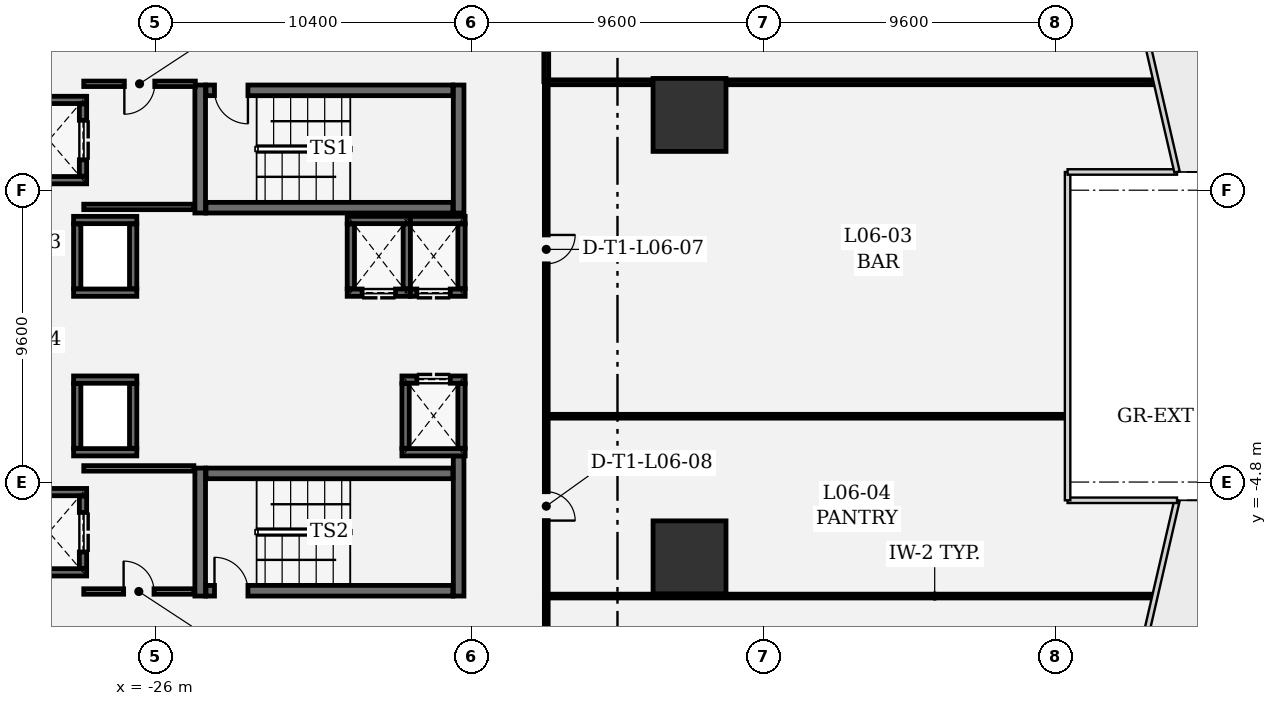
"""IFC4 building model, lengths in metres.
Left out: names, types, materials, properties, quantities, classifications, styles, units other than length and angle.
Written with IfcOpenShell. Run it as: python <this file> out.ifc"""

import sys

from ifc_helpers import new_model, si_unit, direction, frame, frame_2d, origin, origin_2d, place, context, subcontext, project, spatial, rectangle, extrude, element, fill, save


model = new_model("IFC4")
c1 = context("Model", 3, precision=1e-05, world=origin(), true_north=direction((0.0, 1.0)))
c2 = subcontext(c1, "Body", "Model", "MODEL_VIEW")
j1 = project(units=[si_unit("LENGTHUNIT", "METRE"), si_unit("PLANEANGLEUNIT", "RADIAN")], contexts=[c1])
p1 = place(None, origin())
s1 = spatial("IfcSite", under=j1, at=p1, CompositionType="ELEMENT")
p2 = place(p1, origin())
s2 = spatial("IfcBuilding", under=s1, at=p2, CompositionType="ELEMENT")
p3 = place(p2, frame((0.0, 0.0, 32.4)))
s3 = spatial("IfcBuildingStorey", under=s2, at=p3, CompositionType="ELEMENT", Elevation=32.4)
for number, where, z_axis, x_axis in (
    (1, (-8.43, -7.276, 0.0), (0.0, 0.0, 1.0), (1.0, 0.0, 0.0)),
    (2, (-8.43, 7.276, 0.0), (0.0, 0.0, 1.0), (1.0, 0.0, 0.0)),
):
    element("IfcColumn", number, at=place(p3, frame(where, z_axis=z_axis, x_axis=x_axis)), inside=s3, PredefinedType="COLUMN", context=c2, shape_type="SweptSolid", body=[
        extrude(rectangle(XDim=2.4, YDim=2.4, at=origin_2d()), origin(), (0.0, 0.0, 1.0), 4.2),
    ])
for number, where, z_axis, x_axis in (
    (3, (-24.525, 8.26, 0.0), (0.0, 0.0, 1.0), (0.0, -1.0, 0.0)),
    (4, (-16.025, 4.05, 0.0), (0.0, 0.0, 1.0), (0.0, 1.0, 0.0)),
):
    element("IfcWall", number, at=place(p3, frame(where, z_axis=z_axis, x_axis=x_axis)), inside=s3, PredefinedType="SHEAR", context=c2, shape_type="SweptSolid", body=[
        extrude(rectangle(XDim=4.21, YDim=0.35, at=frame_2d((2.105, 0.0))), origin(), (0.0, 0.0, 1.0), 3.92),
    ])
p4 = place(p3, frame((-24.335, 4.225, 0.0), z_axis=(0.0, 0.0, 1.0), x_axis=(1.0, 0.0, 0.0)))
e5 = element("IfcWall", 5, at=p4, inside=s3, PredefinedType="SHEAR", context=c2, shape_type="SweptSolid", body=[
    extrude(rectangle(XDim=8.12, YDim=0.35, at=frame_2d((4.06, 0.0))), origin(), (0.0, 0.0, 1.0), 3.92),
])
p5 = place(p3, frame((-16.215, 8.085, 0.0), z_axis=(0.0, 0.0, 1.0), x_axis=(-1.0, 0.0, 0.0)))
e6 = element("IfcWall", 6, at=p5, inside=s3, PredefinedType="SHEAR", context=c2, shape_type="SweptSolid", body=[
    extrude(rectangle(XDim=8.12, YDim=0.35, at=frame_2d((4.06, 0.0))), origin(), (0.0, 0.0, 1.0), 3.92),
])
p6 = place(p5, frame((6.74, 0.0, 0.0)))
e7 = element("IfcOpeningElement", 7, at=p6, cuts=e6, PredefinedType="OPENING", context=c2, shape_type="SweptSolid", body=[
    extrude(rectangle(XDim=1.1, YDim=2.2, at=frame_2d((0.55, 1.1))), frame((0.0, 0.185, 0.0), z_axis=(0.0, -1.0, 0.0), x_axis=(1.0, 0.0, 0.0)), (0.0, 0.0, 1.0), 0.37),
])
p7 = place(p3, frame((-24.525, -4.34, 0.0), z_axis=(0.0, 0.0, 1.0), x_axis=(0.0, -1.0, 0.0)))
e8 = element("IfcWall", 8, at=p7, inside=s3, PredefinedType="SHEAR", context=c2, shape_type="SweptSolid", body=[
    extrude(rectangle(XDim=4.21, YDim=0.35, at=frame_2d((2.105, 0.0))), origin(), (0.0, 0.0, 1.0), 3.92),
])
p8 = place(p3, frame((-16.025, -8.55, 0.0), z_axis=(0.0, 0.0, 1.0), x_axis=(0.0, 1.0, 0.0)))
e9 = element("IfcWall", 9, at=p8, inside=s3, PredefinedType="SHEAR", context=c2, shape_type="SweptSolid", body=[
    extrude(rectangle(XDim=4.61, YDim=0.35, at=frame_2d((2.305, 0.0))), origin(), (0.0, 0.0, 1.0), 3.92),
])
p9 = place(p3, frame((-24.335, -8.375, 0.0), z_axis=(0.0, 0.0, 1.0), x_axis=(1.0, 0.0, 0.0)))
e10 = element("IfcWall", 10, at=p9, inside=s3, PredefinedType="SHEAR", context=c2, shape_type="SweptSolid", body=[
    extrude(rectangle(XDim=8.12, YDim=0.35, at=frame_2d((4.06, 0.0))), origin(), (0.0, 0.0, 1.0), 3.92),
])
p10 = place(p9, frame((0.28, 0.0, 0.0)))
e11 = element("IfcOpeningElement", 11, at=p10, cuts=e10, PredefinedType="OPENING", context=c2, shape_type="SweptSolid", body=[
    extrude(rectangle(XDim=1.1, YDim=2.2, at=frame_2d((0.55, 1.1))), frame((0.0, 0.185, 0.0), z_axis=(0.0, -1.0, 0.0), x_axis=(1.0, 0.0, 0.0)), (0.0, 0.0, 1.0), 0.37),
])
p11 = place(p3, frame((-16.215, -4.515, 0.0), z_axis=(0.0, 0.0, 1.0), x_axis=(-1.0, 0.0, 0.0)))
e12 = element("IfcWall", 12, at=p11, inside=s3, PredefinedType="SHEAR", context=c2, shape_type="SweptSolid", body=[
    extrude(rectangle(XDim=8.12, YDim=0.35, at=frame_2d((4.06, 0.0))), origin(), (0.0, 0.0, 1.0), 3.92),
])
for number, where, z_axis, x_axis in (
    (13, (-28.26, 5.13, 0.0), (0.0, 0.0, 1.0), (-1.0, 0.0, 0.0)),
    (14, (-30.74, 7.77, 0.0), (0.0, 0.0, 1.0), (1.0, 0.0, 0.0)),
):
    element("IfcWall", number, at=place(p3, frame(where, z_axis=z_axis, x_axis=x_axis)), inside=s3, PredefinedType="SHEAR", context=c2, shape_type="SweptSolid", body=[
        extrude(rectangle(XDim=2.48, YDim=0.24, at=frame_2d((1.24, 0.0))), origin(), (0.0, 0.0, 1.0), 3.92),
    ])
p12 = place(p3, frame((-28.38, 7.638, 0.0), z_axis=(0.0, 0.0, 1.0), x_axis=(0.0, -1.0, 0.0)))
e15 = element("IfcWall", 15, at=p12, inside=s3, PredefinedType="SHEAR", context=c2, shape_type="SweptSolid", body=[
    extrude(rectangle(XDim=2.376, YDim=0.24, at=frame_2d((1.188, 0.0))), origin(), (0.0, 0.0, 1.0), 3.92),
])
p13 = place(p12, frame((0.538, 0.0, 0.0)))
e16 = element("IfcOpeningElement", 16, at=p13, cuts=e15, PredefinedType="OPENING", context=c2, shape_type="SweptSolid", body=[
    extrude(rectangle(XDim=1.3, YDim=2.3, at=frame_2d((0.65, 1.15))), frame((0.0, 0.13, 0.0), z_axis=(0.0, -1.0, 0.0), x_axis=(1.0, 0.0, 0.0)), (0.0, 0.0, 1.0), 0.26),
])
for number, where, z_axis, x_axis in (
    (17, (-28.26, -7.77, 0.0), (0.0, 0.0, 1.0), (-1.0, 0.0, 0.0)),
    (18, (-30.74, -5.13, 0.0), (0.0, 0.0, 1.0), (1.0, 0.0, 0.0)),
):
    element("IfcWall", number, at=place(p3, frame(where, z_axis=z_axis, x_axis=x_axis)), inside=s3, PredefinedType="SHEAR", context=c2, shape_type="SweptSolid", body=[
        extrude(rectangle(XDim=2.48, YDim=0.24, at=frame_2d((1.24, 0.0))), origin(), (0.0, 0.0, 1.0), 3.92),
    ])
p14 = place(p3, frame((-28.38, -5.262, 0.0), z_axis=(0.0, 0.0, 1.0), x_axis=(0.0, -1.0, 0.0)))
e19 = element("IfcWall", 19, at=p14, inside=s3, PredefinedType="SHEAR", context=c2, shape_type="SweptSolid", body=[
    extrude(rectangle(XDim=2.376, YDim=0.24, at=frame_2d((1.188, 0.0))), origin(), (0.0, 0.0, 1.0), 3.92),
])
p15 = place(p14, frame((0.538, 0.0, 0.0)))
e20 = element("IfcOpeningElement", 20, at=p15, cuts=e19, PredefinedType="OPENING", context=c2, shape_type="SweptSolid", body=[
    extrude(rectangle(XDim=1.3, YDim=2.3, at=frame_2d((0.65, 1.15))), frame((0.0, 0.13, 0.0), z_axis=(0.0, -1.0, 0.0), x_axis=(1.0, 0.0, 0.0)), (0.0, 0.0, 1.0), 0.26),
])
for number, where, z_axis, x_axis in (
    (21, (-26.61, 1.43, 0.0), (0.0, 0.0, 1.0), (-1.0, 0.0, 0.0)),
    (22, (-28.69, 3.82, 0.0), (0.0, 0.0, 1.0), (1.0, 0.0, 0.0)),
):
    element("IfcWall", number, at=place(p3, frame(where, z_axis=z_axis, x_axis=x_axis)), inside=s3, PredefinedType="SHEAR", context=c2, shape_type="SweptSolid", body=[
        extrude(rectangle(XDim=2.08, YDim=0.24, at=frame_2d((1.04, 0.0))), origin(), (0.0, 0.0, 1.0), 3.92),
    ])
for number, where, z_axis, x_axis in (
    (23, (-28.57, 1.562, 0.0), (0.0, 0.0, 1.0), (0.0, 1.0, 0.0)),
    (24, (-26.73, 3.688, 0.0), (0.0, 0.0, 1.0), (0.0, -1.0, 0.0)),
):
    element("IfcWall", number, at=place(p3, frame(where, z_axis=z_axis, x_axis=x_axis)), inside=s3, PredefinedType="SHEAR", context=c2, shape_type="SweptSolid", body=[
        extrude(rectangle(XDim=2.126, YDim=0.24, at=frame_2d((1.063, 0.0))), origin(), (0.0, 0.0, 1.0), 3.92),
    ])
p16 = place(p3, frame((-17.61, 1.43, 0.0), z_axis=(0.0, 0.0, 1.0), x_axis=(-1.0, 0.0, 0.0)))
e25 = element("IfcWall", 25, at=p16, inside=s3, PredefinedType="SHEAR", context=c2, shape_type="SweptSolid", body=[
    extrude(rectangle(XDim=2.08, YDim=0.24, at=frame_2d((1.04, 0.0))), origin(), (0.0, 0.0, 1.0), 3.92),
])
p17 = place(p16, frame((0.49, 0.0, 0.0)))
e26 = element("IfcOpeningElement", 26, at=p17, cuts=e25, PredefinedType="OPENING", context=c2, shape_type="SweptSolid", body=[
    extrude(rectangle(XDim=1.1, YDim=2.2, at=frame_2d((0.55, 1.1))), frame((0.0, 0.13, 0.0), z_axis=(0.0, -1.0, 0.0), x_axis=(1.0, 0.0, 0.0)), (0.0, 0.0, 1.0), 0.26),
])
p18 = place(p3, frame((-19.69, 3.82, 0.0), z_axis=(0.0, 0.0, 1.0), x_axis=(1.0, 0.0, 0.0)))
e27 = element("IfcWall", 27, at=p18, inside=s3, PredefinedType="SHEAR", context=c2, shape_type="SweptSolid", body=[
    extrude(rectangle(XDim=2.08, YDim=0.24, at=frame_2d((1.04, 0.0))), origin(), (0.0, 0.0, 1.0), 3.92),
])
for number, where, z_axis, x_axis in (
    (28, (-19.57, 1.562, 0.0), (0.0, 0.0, 1.0), (0.0, 1.0, 0.0)),
    (29, (-17.73, 3.688, 0.0), (0.0, 0.0, 1.0), (0.0, -1.0, 0.0)),
):
    element("IfcWall", number, at=place(p3, frame(where, z_axis=z_axis, x_axis=x_axis)), inside=s3, PredefinedType="SHEAR", context=c2, shape_type="SweptSolid", body=[
        extrude(rectangle(XDim=2.126, YDim=0.24, at=frame_2d((1.063, 0.0))), origin(), (0.0, 0.0, 1.0), 3.92),
    ])
p19 = place(p3, frame((-15.81, 1.43, 0.0), z_axis=(0.0, 0.0, 1.0), x_axis=(-1.0, 0.0, 0.0)))
e30 = element("IfcWall", 30, at=p19, inside=s3, PredefinedType="SHEAR", context=c2, shape_type="SweptSolid", body=[
    extrude(rectangle(XDim=1.8, YDim=0.24, at=frame_2d((0.9, 0.0))), origin(), (0.0, 0.0, 1.0), 3.92),
])
p20 = place(p19, frame((0.49, 0.0, 0.0)))
e31 = element("IfcOpeningElement", 31, at=p20, cuts=e30, PredefinedType="OPENING", context=c2, shape_type="SweptSolid", body=[
    extrude(rectangle(XDim=1.1, YDim=2.2, at=frame_2d((0.55, 1.1))), frame((0.0, 0.13, 0.0), z_axis=(0.0, -1.0, 0.0), x_axis=(1.0, 0.0, 0.0)), (0.0, 0.0, 1.0), 0.26),
])
p21 = place(p3, frame((-17.61, 3.82, 0.0), z_axis=(0.0, 0.0, 1.0), x_axis=(1.0, 0.0, 0.0)))
e32 = element("IfcWall", 32, at=p21, inside=s3, PredefinedType="SHEAR", context=c2, shape_type="SweptSolid", body=[
    extrude(rectangle(XDim=1.8, YDim=0.24, at=frame_2d((0.9, 0.0))), origin(), (0.0, 0.0, 1.0), 3.92),
])
p22 = place(p3, frame((-15.93, 3.688, 0.0), z_axis=(0.0, 0.0, 1.0), x_axis=(0.0, -1.0, 0.0)))
e33 = element("IfcWall", 33, at=p22, inside=s3, PredefinedType="SHEAR", context=c2, shape_type="SweptSolid", body=[
    extrude(rectangle(XDim=2.126, YDim=0.24, at=frame_2d((1.063, 0.0))), origin(), (0.0, 0.0, 1.0), 3.92),
])
for number, where, z_axis, x_axis in (
    (34, (-26.61, -3.82, 0.0), (0.0, 0.0, 1.0), (-1.0, 0.0, 0.0)),
    (35, (-28.69, -1.43, 0.0), (0.0, 0.0, 1.0), (1.0, 0.0, 0.0)),
):
    element("IfcWall", number, at=place(p3, frame(where, z_axis=z_axis, x_axis=x_axis)), inside=s3, PredefinedType="SHEAR", context=c2, shape_type="SweptSolid", body=[
        extrude(rectangle(XDim=2.08, YDim=0.24, at=frame_2d((1.04, 0.0))), origin(), (0.0, 0.0, 1.0), 3.92),
    ])
for number, where, z_axis, x_axis in (
    (36, (-28.57, -3.688, 0.0), (0.0, 0.0, 1.0), (0.0, 1.0, 0.0)),
    (37, (-26.73, -1.562, 0.0), (0.0, 0.0, 1.0), (0.0, -1.0, 0.0)),
):
    element("IfcWall", number, at=place(p3, frame(where, z_axis=z_axis, x_axis=x_axis)), inside=s3, PredefinedType="SHEAR", context=c2, shape_type="SweptSolid", body=[
        extrude(rectangle(XDim=2.126, YDim=0.24, at=frame_2d((1.063, 0.0))), origin(), (0.0, 0.0, 1.0), 3.92),
    ])
p23 = place(p3, frame((-15.81, -3.82, 0.0), z_axis=(0.0, 0.0, 1.0), x_axis=(-1.0, 0.0, 0.0)))
e38 = element("IfcWall", 38, at=p23, inside=s3, PredefinedType="SHEAR", context=c2, shape_type="SweptSolid", body=[
    extrude(rectangle(XDim=2.08, YDim=0.24, at=frame_2d((1.04, 0.0))), origin(), (0.0, 0.0, 1.0), 3.92),
])
p24 = place(p3, frame((-17.89, -1.43, 0.0), z_axis=(0.0, 0.0, 1.0), x_axis=(1.0, 0.0, 0.0)))
e39 = element("IfcWall", 39, at=p24, inside=s3, PredefinedType="SHEAR", context=c2, shape_type="SweptSolid", body=[
    extrude(rectangle(XDim=2.08, YDim=0.24, at=frame_2d((1.04, 0.0))), origin(), (0.0, 0.0, 1.0), 3.92),
])
p25 = place(p24, frame((0.49, 0.0, 0.0)))
e40 = element("IfcOpeningElement", 40, at=p25, cuts=e39, PredefinedType="OPENING", context=c2, shape_type="SweptSolid", body=[
    extrude(rectangle(XDim=1.1, YDim=2.2, at=frame_2d((0.55, 1.1))), frame((0.0, 0.13, 0.0), z_axis=(0.0, -1.0, 0.0), x_axis=(1.0, 0.0, 0.0)), (0.0, 0.0, 1.0), 0.26),
])
for number, where, z_axis, x_axis in (
    (41, (-17.77, -3.688, 0.0), (0.0, 0.0, 1.0), (0.0, 1.0, 0.0)),
    (42, (-15.93, -1.562, 0.0), (0.0, 0.0, 1.0), (0.0, -1.0, 0.0)),
):
    element("IfcWall", number, at=place(p3, frame(where, z_axis=z_axis, x_axis=x_axis)), inside=s3, PredefinedType="SHEAR", context=c2, shape_type="SweptSolid", body=[
        extrude(rectangle(XDim=2.126, YDim=0.24, at=frame_2d((1.063, 0.0))), origin(), (0.0, 0.0, 1.0), 3.92),
    ])
p26 = place(p3, frame((-28.355, 4.25, 0.0), z_axis=(0.0, 0.0, 1.0), x_axis=(1.0, 0.0, 0.0)))
e43 = element("IfcWall", 43, at=p26, inside=s3, PredefinedType="PARTITIONING", context=c2, shape_type="SweptSolid", body=[
    extrude(rectangle(XDim=3.622, YDim=0.18, at=frame_2d((1.811, 0.0))), origin(), (0.0, 0.0, 1.0), 3.92),
])
p27 = place(p3, frame((-24.684, 8.3, 0.0), z_axis=(0.0, 0.0, 1.0), x_axis=(-1.0, 0.0, 0.0)))
e44 = element("IfcWall", 44, at=p27, inside=s3, PredefinedType="PARTITIONING", context=c2, shape_type="SweptSolid", body=[
    extrude(rectangle(XDim=3.671, YDim=0.18, at=frame_2d((1.835, 0.0))), origin(), (0.0, 0.0, 1.0), 3.92),
])
p28 = place(p27, frame((1.335, 0.0, 0.0)))
e45 = element("IfcOpeningElement", 45, at=p28, cuts=e44, PredefinedType="OPENING", context=c2, shape_type="SweptSolid", body=[
    extrude(rectangle(XDim=1.0, YDim=2.15, at=frame_2d((0.5, 1.075))), frame((0.0, 0.1, 0.0), z_axis=(0.0, -1.0, 0.0), x_axis=(1.0, 0.0, 0.0)), (0.0, 0.0, 1.0), 0.2),
])
p29 = place(p3, frame((-28.355, -8.4, 0.0), z_axis=(0.0, 0.0, 1.0), x_axis=(1.0, 0.0, 0.0)))
e46 = element("IfcWall", 46, at=p29, inside=s3, PredefinedType="PARTITIONING", context=c2, shape_type="SweptSolid", body=[
    extrude(rectangle(XDim=3.622, YDim=0.18, at=frame_2d((1.811, 0.0))), origin(), (0.0, 0.0, 1.0), 3.92),
])
p30 = place(p29, frame((1.311, 0.0, 0.0)))
e47 = element("IfcOpeningElement", 47, at=p30, cuts=e46, PredefinedType="OPENING", context=c2, shape_type="SweptSolid", body=[
    extrude(rectangle(XDim=1.0, YDim=2.15, at=frame_2d((0.5, 1.075))), frame((0.0, 0.1, 0.0), z_axis=(0.0, -1.0, 0.0), x_axis=(1.0, 0.0, 0.0)), (0.0, 0.0, 1.0), 0.2),
])
p31 = place(p3, frame((-24.733, -4.35, 0.0), z_axis=(0.0, 0.0, 1.0), x_axis=(-1.0, 0.0, 0.0)))
e48 = element("IfcWall", 48, at=p31, inside=s3, PredefinedType="PARTITIONING", context=c2, shape_type="SweptSolid", body=[
    extrude(rectangle(XDim=3.622, YDim=0.18, at=frame_2d((1.811, 0.0))), origin(), (0.0, 0.0, 1.0), 3.92),
])
p32 = place(p3, frame((-13.142, 8.375, 0.0), z_axis=(0.0, 0.0, 1.0), x_axis=(0.0, 1.0, 0.0)))
e49 = element("IfcWall", 49, at=p32, inside=s3, PredefinedType="PARTITIONING", context=c2, shape_type="SweptSolid", body=[
    extrude(rectangle(XDim=2.358, YDim=0.16, at=frame_2d((1.179, 0.0))), origin(), (0.0, 0.0, 1.0), 3.92),
])
p33 = place(p3, frame((-13.117, 8.35, 0.0), z_axis=(0.0, 0.0, 1.0), x_axis=(1.0, 0.0, 0.0)))
e50 = element("IfcWall", 50, at=p33, inside=s3, PredefinedType="PARTITIONING", context=c2, shape_type="SweptSolid", body=[
    extrude(rectangle(XDim=3.422, YDim=0.16, at=frame_2d((1.711, 0.0))), origin(), (0.0, 0.0, 1.0), 2.957),
])
p34 = place(p3, frame((-7.165, 8.35, 0.0), z_axis=(0.0, 0.0, 1.0), x_axis=(1.0, 0.0, 0.0)))
e51 = element("IfcWall", 51, at=p34, inside=s3, PredefinedType="PARTITIONING", context=c2, shape_type="SweptSolid", body=[
    extrude(rectangle(XDim=14.01, YDim=0.16, at=frame_2d((7.005, 0.0))), origin(), (0.0, 0.0, 1.0), 3.92),
])
p35 = place(p3, frame((6.799, -8.55, 0.0), z_axis=(0.0, 0.0, 1.0), x_axis=(-1.0, 0.0, 0.0)))
e52 = element("IfcWall", 52, at=p35, inside=s3, PredefinedType="PARTITIONING", context=c2, shape_type="SweptSolid", body=[
    extrude(rectangle(XDim=19.916, YDim=0.125, at=frame_2d((9.958, 0.0))), origin(), (0.0, 0.0, 1.0), 2.957),
])
p36 = place(p3, frame((-13.142, -10.933, 0.0), z_axis=(0.0, 0.0, 1.0), x_axis=(0.0, 1.0, 0.0)))
e53 = element("IfcWall", 53, at=p36, inside=s3, PredefinedType="PARTITIONING", context=c2, shape_type="SweptSolid", body=[
    extrude(rectangle(XDim=2.358, YDim=0.125, at=frame_2d((1.179, 0.0))), origin(), (0.0, 0.0, 1.0), 3.92),
])
p37 = place(p3, frame((-13.142, 8.317, 0.0), z_axis=(0.0, 0.0, 1.0), x_axis=(0.0, -1.0, 0.0)))
e54 = element("IfcWall", 54, at=p37, inside=s3, PredefinedType="PARTITIONING", context=c2, shape_type="SweptSolid", body=[
    extrude(rectangle(XDim=10.927, YDim=0.125, at=frame_2d((5.463, 0.0))), origin(), (0.0, 0.0, 1.0), 3.92),
])
p38 = place(p37, frame((4.989, 0.0, 0.0)))
e55 = element("IfcOpeningElement", 55, at=p38, cuts=e54, PredefinedType="OPENING", context=c2, shape_type="SweptSolid", body=[
    extrude(rectangle(XDim=0.95, YDim=2.15, at=frame_2d((0.475, 1.075))), frame((0.0, 0.073, 0.0), z_axis=(0.0, -1.0, 0.0), x_axis=(1.0, 0.0, 0.0)), (0.0, 0.0, 1.0), 0.145),
])
p39 = place(p3, frame((-13.117, -2.635, 0.0), z_axis=(0.0, 0.0, 1.0), x_axis=(1.0, 0.0, 0.0)))
e56 = element("IfcWall", 56, at=p39, inside=s3, PredefinedType="PARTITIONING", context=c2, shape_type="SweptSolid", body=[
    extrude(rectangle(XDim=17.042, YDim=0.125, at=frame_2d((8.521, 0.0))), origin(), (0.0, 0.0, 1.0), 3.92),
])
p40 = place(p3, frame((-13.142, -2.668, 0.0), z_axis=(0.0, 0.0, 1.0), x_axis=(0.0, -1.0, 0.0)))
e57 = element("IfcWall", 57, at=p40, inside=s3, PredefinedType="PARTITIONING", context=c2, shape_type="SweptSolid", body=[
    extrude(rectangle(XDim=5.849, YDim=0.125, at=frame_2d((2.924, 0.0))), origin(), (0.0, 0.0, 1.0), 3.92),
])
p41 = place(p40, frame((2.449, 0.0, 0.0)))
e58 = element("IfcOpeningElement", 58, at=p41, cuts=e57, PredefinedType="OPENING", context=c2, shape_type="SweptSolid", body=[
    extrude(rectangle(XDim=0.95, YDim=2.15, at=frame_2d((0.475, 1.075))), frame((0.0, 0.073, 0.0), z_axis=(0.0, -1.0, 0.0), x_axis=(1.0, 0.0, 0.0)), (0.0, 0.0, 1.0), 0.145),
])
p42 = place(p6, origin())
e59 = element("IfcDoor", 59, at=p42, inside=s3, OperationType="SINGLE_SWING_LEFT", PredefinedType="DOOR", context=c2, shape_type="SweptSolid", body=[
    extrude(rectangle(XDim=1.1, YDim=2.2, at=frame_2d((0.55, 1.1))), frame((0.0, 0.025, 0.0), z_axis=(0.0, -1.0, 0.0), x_axis=(1.0, 0.0, 0.0)), (0.0, 0.0, 1.0), 0.05),
])
fill(e7, e59)
p43 = place(p10, origin())
e60 = element("IfcDoor", 60, at=p43, inside=s3, OperationType="SINGLE_SWING_LEFT", PredefinedType="DOOR", context=c2, shape_type="SweptSolid", body=[
    extrude(rectangle(XDim=1.1, YDim=2.2, at=frame_2d((0.55, 1.1))), frame((0.0, 0.025, 0.0), z_axis=(0.0, -1.0, 0.0), x_axis=(1.0, 0.0, 0.0)), (0.0, 0.0, 1.0), 0.05),
])
fill(e11, e60)
p44 = place(p13, origin())
e61 = element("IfcDoor", 61, at=p44, inside=s3, OperationType="DOUBLE_DOOR_SLIDING", PredefinedType="DOOR", context=c2, shape_type="SweptSolid", body=[
    extrude(rectangle(XDim=1.3, YDim=2.3, at=frame_2d((0.65, 1.15))), frame((0.0, 0.025, 0.0), z_axis=(0.0, -1.0, 0.0), x_axis=(1.0, 0.0, 0.0)), (0.0, 0.0, 1.0), 0.05),
])
fill(e16, e61)
p45 = place(p15, origin())
e62 = element("IfcDoor", 62, at=p45, inside=s3, OperationType="DOUBLE_DOOR_SLIDING", PredefinedType="DOOR", context=c2, shape_type="SweptSolid", body=[
    extrude(rectangle(XDim=1.3, YDim=2.3, at=frame_2d((0.65, 1.15))), frame((0.0, 0.025, 0.0), z_axis=(0.0, -1.0, 0.0), x_axis=(1.0, 0.0, 0.0)), (0.0, 0.0, 1.0), 0.05),
])
fill(e20, e62)
p46 = place(p17, origin())
e63 = element("IfcDoor", 63, at=p46, inside=s3, OperationType="DOUBLE_DOOR_SLIDING", PredefinedType="DOOR", context=c2, shape_type="SweptSolid", body=[
    extrude(rectangle(XDim=1.1, YDim=2.2, at=frame_2d((0.55, 1.1))), frame((0.0, 0.025, 0.0), z_axis=(0.0, -1.0, 0.0), x_axis=(1.0, 0.0, 0.0)), (0.0, 0.0, 1.0), 0.05),
])
fill(e26, e63)
p47 = place(p20, origin())
e64 = element("IfcDoor", 64, at=p47, inside=s3, OperationType="DOUBLE_DOOR_SLIDING", PredefinedType="DOOR", context=c2, shape_type="SweptSolid", body=[
    extrude(rectangle(XDim=1.1, YDim=2.2, at=frame_2d((0.55, 1.1))), frame((0.0, 0.025, 0.0), z_axis=(0.0, -1.0, 0.0), x_axis=(1.0, 0.0, 0.0)), (0.0, 0.0, 1.0), 0.05),
])
fill(e31, e64)
p48 = place(p25, origin())
e65 = element("IfcDoor", 65, at=p48, inside=s3, OperationType="DOUBLE_DOOR_SLIDING", PredefinedType="DOOR", context=c2, shape_type="SweptSolid", body=[
    extrude(rectangle(XDim=1.1, YDim=2.2, at=frame_2d((0.55, 1.1))), frame((0.0, 0.025, 0.0), z_axis=(0.0, -1.0, 0.0), x_axis=(1.0, 0.0, 0.0)), (0.0, 0.0, 1.0), 0.05),
])
fill(e40, e65)
p49 = place(p38, origin())
e66 = element("IfcDoor", 66, at=p49, inside=s3, OperationType="SINGLE_SWING_LEFT", PredefinedType="DOOR", context=c2, shape_type="SweptSolid", body=[
    extrude(rectangle(XDim=0.95, YDim=2.15, at=frame_2d((0.475, 1.075))), frame((0.0, 0.025, 0.0), z_axis=(0.0, -1.0, 0.0), x_axis=(1.0, 0.0, 0.0)), (0.0, 0.0, 1.0), 0.05),
])
fill(e55, e66)
p50 = place(p41, origin())
e67 = element("IfcDoor", 67, at=p50, inside=s3, OperationType="SINGLE_SWING_RIGHT", PredefinedType="DOOR", context=c2, shape_type="SweptSolid", body=[
    extrude(rectangle(XDim=0.95, YDim=2.15, at=frame_2d((0.475, 1.075))), frame((0.0, 0.025, 0.0), z_axis=(0.0, -1.0, 0.0), x_axis=(1.0, 0.0, 0.0)), (0.0, 0.0, 1.0), 0.05),
])
fill(e58, e67)
p51 = place(p28, origin())
e68 = element("IfcDoor", 68, at=p51, inside=s3, OperationType="SINGLE_SWING_RIGHT", PredefinedType="DOOR", context=c2, shape_type="SweptSolid", body=[
    extrude(rectangle(XDim=1.0, YDim=2.15, at=frame_2d((0.5, 1.075))), frame((0.0, 0.025, 0.0), z_axis=(0.0, -1.0, 0.0), x_axis=(1.0, 0.0, 0.0)), (0.0, 0.0, 1.0), 0.05),
])
fill(e45, e68)
p52 = place(p30, origin())
e69 = element("IfcDoor", 69, at=p52, inside=s3, OperationType="SINGLE_SWING_LEFT", PredefinedType="DOOR", context=c2, shape_type="SweptSolid", body=[
    extrude(rectangle(XDim=1.0, YDim=2.15, at=frame_2d((0.5, 1.075))), frame((0.0, 0.025, 0.0), z_axis=(0.0, -1.0, 0.0), x_axis=(1.0, 0.0, 0.0)), (0.0, 0.0, 1.0), 0.05),
])
fill(e47, e69)
save(model, sys.argv[1])
